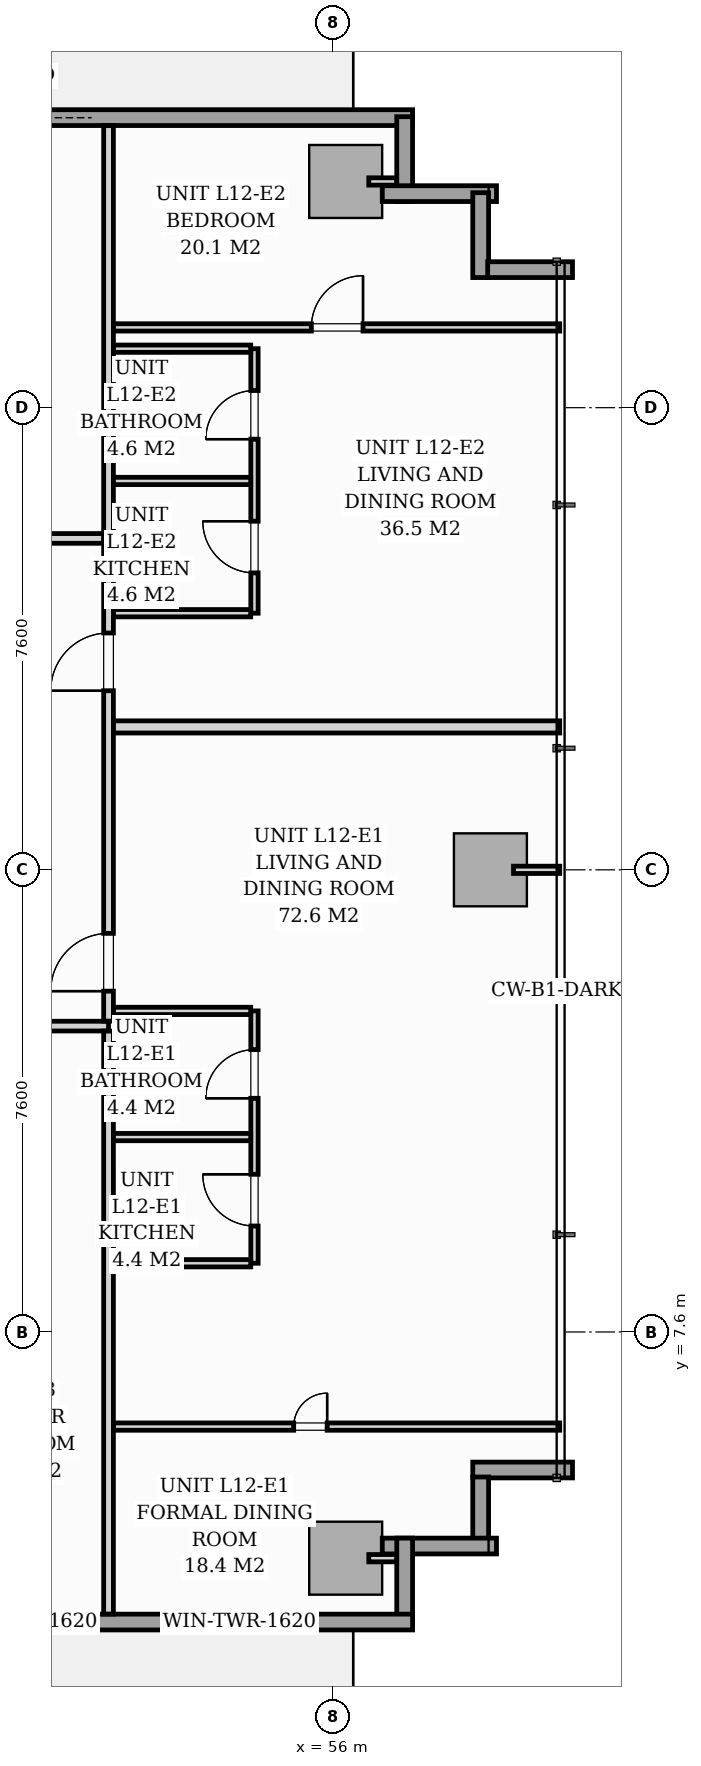
"""IFC4 building model, lengths in metres.
Left out: names, types, materials, properties, quantities, classifications, styles, units other than length and angle.
Written with IfcOpenShell. Run it as: python <this file> out.ifc"""

import sys

from ifc_helpers import new_model, si_unit, direction, frame, frame_2d, origin, origin_2d, place, context, subcontext, project, spatial, rectangle, extrude, source, transform, mapped, element, fill, save


model = new_model("IFC4")
c1 = context("Model", 3, precision=1e-05, world=origin(), true_north=direction((0.0, 1.0)))
c2 = subcontext(c1, "Body", "Model", "MODEL_VIEW")
j1 = project(units=[si_unit("LENGTHUNIT", "METRE"), si_unit("PLANEANGLEUNIT", "RADIAN")], contexts=[c1])
p1 = place(None, origin())
s1 = spatial("IfcSite", under=j1, at=p1, CompositionType="ELEMENT")
p2 = place(p1, origin())
s2 = spatial("IfcBuilding", under=s1, at=p2, CompositionType="ELEMENT")
p3 = place(p2, frame((0.0, 0.0, 45.4)))
s3 = spatial("IfcBuildingStorey", under=s2, at=p3, CompositionType="ELEMENT", Elevation=45.4)
m1 = source(origin(), c2, "Body", "SweptSolid", [
    extrude(rectangle(XDim=1.2, YDim=1.2, at=origin_2d()), origin(), (0.0, 0.0, 1.0), 3.196),
])
for number, where, z_axis, x_axis in (
    (1, (56.2, 3.88, 0.002), (0.0, 0.0, 1.0), (1.0, 0.0, 0.0)),
    (2, (56.2, 26.52, 0.002), (0.0, 0.0, 1.0), (1.0, 0.0, 0.0)),
    (3, (58.58, 15.2, 0.002), (0.0, 0.0, 1.0), (1.0, 0.0, 0.0)),
):
    element("IfcColumn", number, at=place(p3, frame(where, z_axis=z_axis, x_axis=x_axis)), inside=s3, PredefinedType="COLUMN", context=c2, shape_type="MappedRepresentation", body=[
        mapped(m1, transform((0.0, 0.0, 0.0), scale=1.0)),
    ])
p4 = place(p3, frame((40.15, 27.57, 0.0), z_axis=(0.0, 0.0, 1.0), x_axis=(1.0, 0.0, 0.0)))
e4 = element("IfcWall", 4, at=p4, inside=s3, PredefinedType="STANDARD", context=c2, shape_type="SweptSolid", body=[
    extrude(rectangle(XDim=17.15, YDim=0.26, at=frame_2d((8.575, 0.0))), origin(), (0.0, 0.0, 1.0), 2.94),
])
p5 = place(p4, frame((9.26, 0.0, 0.0)))
e5 = element("IfcOpeningElement", 5, at=p5, cuts=e4, PredefinedType="OPENING", context=c2, shape_type="SweptSolid", body=[
    extrude(rectangle(XDim=1.8, YDim=2.06, at=frame_2d((0.9, 1.03))), frame((0.0, 0.14, 0.0), z_axis=(0.0, -1.0, 0.0), x_axis=(1.0, 0.0, 0.0)), (0.0, 0.0, 1.0), 0.28),
])
p6 = place(p4, frame((0.7, 0.0, 0.65)))
e6 = element("IfcOpeningElement", 6, at=p6, cuts=e4, PredefinedType="OPENING", context=c2, shape_type="SweptSolid", body=[
    extrude(rectangle(XDim=1.6, YDim=1.5, at=frame_2d((0.8, 0.75))), frame((0.0, 0.14, 0.0), z_axis=(0.0, -1.0, 0.0), x_axis=(1.0, 0.0, 0.0)), (0.0, 0.0, 1.0), 0.28),
])
p7 = place(p3, frame((57.17, 27.585, 0.0), z_axis=(0.0, 0.0, 1.0), x_axis=(0.0, -1.0, 0.0)))
e7 = element("IfcWall", 7, at=p7, inside=s3, PredefinedType="STANDARD", context=c2, shape_type="SweptSolid", body=[
    extrude(rectangle(XDim=1.395, YDim=0.26, at=frame_2d((0.698, 0.0))), origin(), (0.0, 0.0, 1.0), 2.94),
])
p8 = place(p3, frame((56.802, 26.32, 0.0), z_axis=(0.0, 0.0, 1.0), x_axis=(1.0, 0.0, 0.0)))
e8 = element("IfcWall", 8, at=p8, inside=s3, PredefinedType="STANDARD", context=c2, shape_type="SweptSolid", body=[
    extrude(rectangle(XDim=1.878, YDim=0.26, at=frame_2d((0.939, 0.0))), origin(), (0.0, 0.0, 1.0), 2.94),
])
for number, where, z_axis, x_axis in (
    (9, (58.42, 26.335, 0.0), (0.0, 0.0, 1.0), (0.0, -1.0, 0.0)),
    (10, (58.535, 25.07, 0.0), (0.0, 0.0, 1.0), (1.0, 0.0, 0.0)),
):
    element("IfcWall", number, at=place(p3, frame(where, z_axis=z_axis, x_axis=x_axis)), inside=s3, PredefinedType="STANDARD", context=c2, shape_type="SweptSolid", body=[
        extrude(rectangle(XDim=1.395, YDim=0.26, at=frame_2d((0.698, 0.0))), origin(), (0.0, 0.0, 1.0), 2.94),
    ])
p9 = place(p3, frame((59.93, 5.33, 0.0), z_axis=(0.0, 0.0, 1.0), x_axis=(-1.0, 0.0, 0.0)))
e11 = element("IfcWall", 11, at=p9, inside=s3, PredefinedType="STANDARD", context=c2, shape_type="SweptSolid", body=[
    extrude(rectangle(XDim=1.64, YDim=0.26, at=frame_2d((0.82, 0.0))), origin(), (0.0, 0.0, 1.0), 2.94),
])
p10 = place(p3, frame((58.42, 5.215, 0.0), z_axis=(0.0, 0.0, 1.0), x_axis=(0.0, -1.0, 0.0)))
e12 = element("IfcWall", 12, at=p10, inside=s3, PredefinedType="STANDARD", context=c2, shape_type="SweptSolid", body=[
    extrude(rectangle(XDim=1.15, YDim=0.26, at=frame_2d((0.575, 0.0))), origin(), (0.0, 0.0, 1.0), 2.94),
])
p11 = place(p3, frame((58.68, 4.08, 0.0), z_axis=(0.0, 0.0, 1.0), x_axis=(-1.0, 0.0, 0.0)))
e13 = element("IfcWall", 13, at=p11, inside=s3, PredefinedType="STANDARD", context=c2, shape_type="SweptSolid", body=[
    extrude(rectangle(XDim=1.878, YDim=0.26, at=frame_2d((0.939, 0.0))), origin(), (0.0, 0.0, 1.0), 2.94),
])
p12 = place(p3, frame((57.17, 4.21, 0.0), z_axis=(0.0, 0.0, 1.0), x_axis=(0.0, -1.0, 0.0)))
e14 = element("IfcWall", 14, at=p12, inside=s3, PredefinedType="STANDARD", context=c2, shape_type="SweptSolid", body=[
    extrude(rectangle(XDim=1.395, YDim=0.26, at=frame_2d((0.698, 0.0))), origin(), (0.0, 0.0, 1.0), 2.94),
])
p13 = place(p3, frame((57.3, 2.83, 0.0), z_axis=(0.0, 0.0, 1.0), x_axis=(-1.0, 0.0, 0.0)))
e15 = element("IfcWall", 15, at=p13, inside=s3, PredefinedType="STANDARD", context=c2, shape_type="SweptSolid", body=[
    extrude(rectangle(XDim=17.15, YDim=0.26, at=frame_2d((8.575, 0.0))), origin(), (0.0, 0.0, 1.0), 2.94),
])
p14 = place(p13, frame((8.177, 0.0, 0.0)))
e16 = element("IfcOpeningElement", 16, at=p14, cuts=e15, PredefinedType="OPENING", context=c2, shape_type="SweptSolid", body=[
    extrude(rectangle(XDim=1.8, YDim=2.06, at=frame_2d((0.9, 1.03))), frame((0.0, 0.14, 0.0), z_axis=(0.0, -1.0, 0.0), x_axis=(1.0, 0.0, 0.0)), (0.0, 0.0, 1.0), 0.28),
])
p15 = place(p13, frame((2.05, 0.0, 0.65)))
e17 = element("IfcOpeningElement", 17, at=p15, cuts=e15, PredefinedType="OPENING", context=c2, shape_type="SweptSolid", body=[
    extrude(rectangle(XDim=1.6, YDim=1.5, at=frame_2d((0.8, 0.75))), frame((0.0, 0.14, 0.0), z_axis=(0.0, -1.0, 0.0), x_axis=(1.0, 0.0, 0.0)), (0.0, 0.0, 1.0), 0.28),
])
p16 = place(p13, frame((5.644, 0.0, 0.75)))
e18 = element("IfcOpeningElement", 18, at=p16, cuts=e15, PredefinedType="OPENING", context=c2, shape_type="SweptSolid", body=[
    extrude(rectangle(XDim=1.6, YDim=1.5, at=frame_2d((0.8, 0.75))), frame((0.0, 0.14, 0.0), z_axis=(0.0, -1.0, 0.0), x_axis=(1.0, 0.0, 0.0)), (0.0, 0.0, 1.0), 0.28),
])
p17 = place(p3, frame((15.2, 12.63, 0.0), z_axis=(0.0, 0.0, 1.0), x_axis=(1.0, 0.0, 0.0)))
e19 = element("IfcWall", 19, at=p17, inside=s3, PredefinedType="PARTITIONING", context=c2, shape_type="SweptSolid", body=[
    extrude(rectangle(XDim=37.1, YDim=0.16, at=frame_2d((18.55, 0.0))), origin(), (0.0, 0.0, 1.0), 2.94),
])
p18 = place(p17, frame((1.572, 0.0, 0.0)))
e20 = element("IfcOpeningElement", 20, at=p18, cuts=e19, PredefinedType="OPENING", context=c2, shape_type="SweptSolid", body=[
    extrude(rectangle(XDim=0.95, YDim=2.06, at=frame_2d((0.475, 1.03))), frame((0.0, 0.09, 0.0), z_axis=(0.0, -1.0, 0.0), x_axis=(1.0, 0.0, 0.0)), (0.0, 0.0, 1.0), 0.18),
])
p19 = place(p17, frame((14.877, 0.0, 0.0)))
e21 = element("IfcOpeningElement", 21, at=p19, cuts=e19, PredefinedType="OPENING", context=c2, shape_type="SweptSolid", body=[
    extrude(rectangle(XDim=0.95, YDim=2.06, at=frame_2d((0.475, 1.03))), frame((0.0, 0.09, 0.0), z_axis=(0.0, -1.0, 0.0), x_axis=(1.0, 0.0, 0.0)), (0.0, 0.0, 1.0), 0.18),
])
p20 = place(p17, frame((28.476, 0.0, 0.0)))
e22 = element("IfcOpeningElement", 22, at=p20, cuts=e19, PredefinedType="OPENING", context=c2, shape_type="SweptSolid", body=[
    extrude(rectangle(XDim=0.95, YDim=2.06, at=frame_2d((0.475, 1.03))), frame((0.0, 0.09, 0.0), z_axis=(0.0, -1.0, 0.0), x_axis=(1.0, 0.0, 0.0)), (0.0, 0.0, 1.0), 0.18),
])
p21 = place(p3, frame((52.3, 2.962, 0.0), z_axis=(0.0, 0.0, 1.0), x_axis=(0.0, 1.0, 0.0)))
e23 = element("IfcWall", 23, at=p21, inside=s3, PredefinedType="PARTITIONING", context=c2, shape_type="SweptSolid", body=[
    extrude(rectangle(XDim=9.586, YDim=0.16, at=frame_2d((4.793, 0.0))), origin(), (0.0, 0.0, 1.0), 2.94),
])
p22 = place(p3, frame((52.3, 12.712, 0.0), z_axis=(0.0, 0.0, 1.0), x_axis=(0.0, 1.0, 0.0)))
e24 = element("IfcWall", 24, at=p22, inside=s3, PredefinedType="PARTITIONING", context=c2, shape_type="SweptSolid", body=[
    extrude(rectangle(XDim=14.726, YDim=0.16, at=frame_2d((7.363, 0.0))), origin(), (0.0, 0.0, 1.0), 2.94),
])
p23 = place(p22, frame((0.493, 0.0, 0.0)))
e25 = element("IfcOpeningElement", 25, at=p23, cuts=e24, PredefinedType="OPENING", context=c2, shape_type="SweptSolid", body=[
    extrude(rectangle(XDim=0.95, YDim=2.06, at=frame_2d((0.475, 1.03))), frame((0.0, 0.09, 0.0), z_axis=(0.0, -1.0, 0.0), x_axis=(1.0, 0.0, 0.0)), (0.0, 0.0, 1.0), 0.18),
])
p24 = place(p22, frame((5.433, 0.0, 0.0)))
e26 = element("IfcOpeningElement", 26, at=p24, cuts=e24, PredefinedType="OPENING", context=c2, shape_type="SweptSolid", body=[
    extrude(rectangle(XDim=0.95, YDim=2.06, at=frame_2d((0.475, 1.03))), frame((0.0, 0.09, 0.0), z_axis=(0.0, -1.0, 0.0), x_axis=(1.0, 0.0, 0.0)), (0.0, 0.0, 1.0), 0.18),
])
p25 = place(p3, frame((52.382, 17.55, 0.0), z_axis=(0.0, 0.0, 1.0), x_axis=(1.0, 0.0, 0.0)))
e27 = element("IfcWall", 27, at=p25, inside=s3, PredefinedType="PARTITIONING", context=c2, shape_type="SweptSolid", body=[
    extrude(rectangle(XDim=7.338, YDim=0.2, at=frame_2d((3.669, 0.0))), origin(), (0.0, 0.0, 1.0), 2.94),
])
p26 = place(p3, frame((54.7, 8.73, 0.0), z_axis=(0.0, 0.0, 1.0), x_axis=(0.0, 1.0, 0.0)))
e28 = element("IfcWall", 28, at=p26, inside=s3, PredefinedType="PARTITIONING", context=c2, shape_type="SweptSolid", body=[
    extrude(rectangle(XDim=4.15, YDim=0.12, at=frame_2d((2.075, 0.0))), origin(), (0.0, 0.0, 1.0), 2.94),
])
p27 = place(p26, frame((0.613, 0.0, 0.0)))
e29 = element("IfcOpeningElement", 29, at=p27, cuts=e28, PredefinedType="OPENING", context=c2, shape_type="SweptSolid", body=[
    extrude(rectangle(XDim=0.85, YDim=2.05, at=frame_2d((0.425, 1.025))), frame((0.0, 0.07, 0.0), z_axis=(0.0, -1.0, 0.0), x_axis=(1.0, 0.0, 0.0)), (0.0, 0.0, 1.0), 0.14),
])
p28 = place(p26, frame((2.713, 0.0, 0.0)))
e30 = element("IfcOpeningElement", 30, at=p28, cuts=e28, PredefinedType="OPENING", context=c2, shape_type="SweptSolid", body=[
    extrude(rectangle(XDim=0.8, YDim=2.02, at=frame_2d((0.4, 1.01))), frame((0.0, 0.07, 0.0), z_axis=(0.0, -1.0, 0.0), x_axis=(1.0, 0.0, 0.0)), (0.0, 0.0, 1.0), 0.14),
])
for number, where, z_axis, x_axis in (
    (31, (52.382, 10.805, 0.0), (0.0, 0.0, 1.0), (1.0, 0.0, 0.0)),
    (32, (52.382, 8.73, 0.0), (0.0, 0.0, 1.0), (1.0, 0.0, 0.0)),
    (33, (52.382, 12.88, 0.0), (0.0, 0.0, 1.0), (1.0, 0.0, 0.0)),
):
    element("IfcWall", number, at=place(p3, frame(where, z_axis=z_axis, x_axis=x_axis)), inside=s3, PredefinedType="PARTITIONING", context=c2, shape_type="SweptSolid", body=[
        extrude(rectangle(XDim=2.256, YDim=0.12, at=frame_2d((1.128, 0.0))), origin(), (0.0, 0.0, 1.0), 2.94),
    ])
p29 = place(p3, frame((52.382, 6.044, 0.0), z_axis=(0.0, 0.0, 1.0), x_axis=(1.0, 0.0, 0.0)))
e34 = element("IfcWall", 34, at=p29, inside=s3, PredefinedType="PARTITIONING", context=c2, shape_type="SweptSolid", body=[
    extrude(rectangle(XDim=7.338, YDim=0.12, at=frame_2d((3.669, 0.0))), origin(), (0.0, 0.0, 1.0), 2.94),
])
p30 = place(p29, frame((2.963, 0.0, 0.0)))
e35 = element("IfcOpeningElement", 35, at=p30, cuts=e34, PredefinedType="OPENING", context=c2, shape_type="SweptSolid", body=[
    extrude(rectangle(XDim=0.55, YDim=2.0, at=frame_2d((0.275, 1.0))), frame((0.0, 0.07, 0.0), z_axis=(0.0, -1.0, 0.0), x_axis=(1.0, 0.0, 0.0)), (0.0, 0.0, 1.0), 0.14),
])
p31 = place(p3, frame((54.7, 19.42, 0.0), z_axis=(0.0, 0.0, 1.0), x_axis=(0.0, 1.0, 0.0)))
e36 = element("IfcWall", 36, at=p31, inside=s3, PredefinedType="PARTITIONING", context=c2, shape_type="SweptSolid", body=[
    extrude(rectangle(XDim=4.35, YDim=0.12, at=frame_2d((2.175, 0.0))), origin(), (0.0, 0.0, 1.0), 2.94),
])
p32 = place(p31, frame((0.663, 0.0, 0.0)))
e37 = element("IfcOpeningElement", 37, at=p32, cuts=e36, PredefinedType="OPENING", context=c2, shape_type="SweptSolid", body=[
    extrude(rectangle(XDim=0.85, YDim=2.05, at=frame_2d((0.425, 1.025))), frame((0.0, 0.07, 0.0), z_axis=(0.0, -1.0, 0.0), x_axis=(1.0, 0.0, 0.0)), (0.0, 0.0, 1.0), 0.14),
])
p33 = place(p31, frame((2.862, 0.0, 0.0)))
e38 = element("IfcOpeningElement", 38, at=p33, cuts=e36, PredefinedType="OPENING", context=c2, shape_type="SweptSolid", body=[
    extrude(rectangle(XDim=0.8, YDim=2.02, at=frame_2d((0.4, 1.01))), frame((0.0, 0.07, 0.0), z_axis=(0.0, -1.0, 0.0), x_axis=(1.0, 0.0, 0.0)), (0.0, 0.0, 1.0), 0.14),
])
for number, where, z_axis, x_axis in (
    (39, (52.382, 21.595, 0.0), (0.0, 0.0, 1.0), (1.0, 0.0, 0.0)),
    (40, (52.382, 19.42, 0.0), (0.0, 0.0, 1.0), (1.0, 0.0, 0.0)),
    (41, (52.382, 23.77, 0.0), (0.0, 0.0, 1.0), (1.0, 0.0, 0.0)),
):
    element("IfcWall", number, at=place(p3, frame(where, z_axis=z_axis, x_axis=x_axis)), inside=s3, PredefinedType="PARTITIONING", context=c2, shape_type="SweptSolid", body=[
        extrude(rectangle(XDim=2.256, YDim=0.12, at=frame_2d((1.128, 0.0))), origin(), (0.0, 0.0, 1.0), 2.94),
    ])
p34 = place(p3, frame((52.382, 24.12, 0.0), z_axis=(0.0, 0.0, 1.0), x_axis=(1.0, 0.0, 0.0)))
e42 = element("IfcWall", 42, at=p34, inside=s3, PredefinedType="PARTITIONING", context=c2, shape_type="SweptSolid", body=[
    extrude(rectangle(XDim=7.338, YDim=0.12, at=frame_2d((3.669, 0.0))), origin(), (0.0, 0.0, 1.0), 2.94),
])
p35 = place(p34, frame((3.253, 0.0, 0.0)))
e43 = element("IfcOpeningElement", 43, at=p35, cuts=e42, PredefinedType="OPENING", context=c2, shape_type="SweptSolid", body=[
    extrude(rectangle(XDim=0.85, YDim=2.05, at=frame_2d((0.425, 1.025))), frame((0.0, 0.07, 0.0), z_axis=(0.0, -1.0, 0.0), x_axis=(1.0, 0.0, 0.0)), (0.0, 0.0, 1.0), 0.14),
])
p36 = place(p3, frame((50.432, 20.65, 0.0), z_axis=(0.0, 0.0, 1.0), x_axis=(1.0, 0.0, 0.0)))
e44 = element("IfcWall", 44, at=p36, inside=s3, PredefinedType="PARTITIONING", context=c2, shape_type="SweptSolid", body=[
    extrude(rectangle(XDim=1.786, YDim=0.16, at=frame_2d((0.893, 0.0))), origin(), (0.0, 0.0, 1.0), 2.94),
])
for number, where, z_axis, x_axis in (
    (45, (56.58, 3.88, 0.0), (0.0, 0.0, 1.0), (1.0, 0.0, 0.0)),
    (46, (56.58, 26.52, 0.0), (0.0, 0.0, 1.0), (1.0, 0.0, 0.0)),
):
    element("IfcWall", number, at=place(p3, frame(where, z_axis=z_axis, x_axis=x_axis)), inside=s3, PredefinedType="PARTITIONING", context=c2, shape_type="SweptSolid", body=[
        extrude(rectangle(XDim=0.458, YDim=0.12, at=frame_2d((0.229, 0.0))), origin(), (0.0, 0.0, 1.0), 2.94),
    ])
p37 = place(p3, frame((58.96, 15.2, 0.0), z_axis=(0.0, 0.0, 1.0), x_axis=(1.0, 0.0, 0.0)))
e47 = element("IfcWall", 47, at=p37, inside=s3, PredefinedType="PARTITIONING", context=c2, shape_type="SweptSolid", body=[
    extrude(rectangle(XDim=0.76, YDim=0.12, at=frame_2d((0.38, 0.0))), origin(), (0.0, 0.0, 1.0), 2.94),
])
m2 = source(origin(), c2, "Body", "SweptSolid", [
    extrude(rectangle(XDim=1.6, YDim=1.5, at=frame_2d((0.8, 0.75))), frame((0.0, 0.03, 0.0), z_axis=(0.0, -1.0, 0.0), x_axis=(1.0, 0.0, 0.0)), (0.0, 0.0, 1.0), 0.06),
])
p38 = place(p15, origin())
e48 = element("IfcWindow", 48, at=p38, inside=s3, PartitioningType="SINGLE_PANEL", PredefinedType="WINDOW", context=c2, shape_type="MappedRepresentation", body=[
    mapped(m2, transform((0.0, 0.0, 0.0), scale=1.0)),
])
fill(e17, e48)
p39 = place(p16, origin())
e49 = element("IfcWindow", 49, at=p39, inside=s3, PartitioningType="SINGLE_PANEL", PredefinedType="WINDOW", context=c2, shape_type="MappedRepresentation", body=[
    mapped(m2, transform((0.0, 0.0, 0.0), scale=1.0)),
])
fill(e18, e49)
m3 = source(origin(), c2, "Body", "SweptSolid", [
    extrude(rectangle(XDim=0.95, YDim=2.06, at=frame_2d((0.475, 1.03))), frame((0.0, 0.025, 0.0), z_axis=(0.0, -1.0, 0.0), x_axis=(1.0, 0.0, 0.0)), (0.0, 0.0, 1.0), 0.05),
])
p40 = place(p23, origin())
e50 = element("IfcDoor", 50, at=p40, inside=s3, OperationType="SINGLE_SWING_LEFT", PredefinedType="DOOR", context=c2, shape_type="MappedRepresentation", body=[
    mapped(m3, transform((0.0, 0.0, 0.0), scale=1.0)),
])
fill(e25, e50)
m4 = source(origin(), c2, "Body", "SweptSolid", [
    extrude(rectangle(XDim=0.85, YDim=2.05, at=frame_2d((0.425, 1.025))), frame((0.0, 0.025, 0.0), z_axis=(0.0, -1.0, 0.0), x_axis=(1.0, 0.0, 0.0)), (0.0, 0.0, 1.0), 0.05),
])
p41 = place(p27, origin())
e51 = element("IfcDoor", 51, at=p41, inside=s3, OperationType="SINGLE_SWING_RIGHT", PredefinedType="DOOR", context=c2, shape_type="MappedRepresentation", body=[
    mapped(m4, transform((0.0, 0.0, 0.0), scale=1.0)),
])
fill(e29, e51)
m5 = source(origin(), c2, "Body", "SweptSolid", [
    extrude(rectangle(XDim=0.8, YDim=2.02, at=frame_2d((0.4, 1.01))), frame((0.0, 0.025, 0.0), z_axis=(0.0, -1.0, 0.0), x_axis=(1.0, 0.0, 0.0)), (0.0, 0.0, 1.0), 0.05),
])
p42 = place(p28, origin())
e52 = element("IfcDoor", 52, at=p42, inside=s3, OperationType="SINGLE_SWING_LEFT", PredefinedType="DOOR", context=c2, shape_type="MappedRepresentation", body=[
    mapped(m5, transform((0.0, 0.0, 0.0), scale=1.0)),
])
fill(e30, e52)
m6 = source(origin(), c2, "Body", "SweptSolid", [
    extrude(rectangle(XDim=0.55, YDim=2.0, at=frame_2d((0.275, 1.0))), frame((0.0, 0.025, 0.0), z_axis=(0.0, -1.0, 0.0), x_axis=(1.0, 0.0, 0.0)), (0.0, 0.0, 1.0), 0.05),
])
p43 = place(p30, origin())
e53 = element("IfcDoor", 53, at=p43, inside=s3, OperationType="SINGLE_SWING_RIGHT", PredefinedType="DOOR", context=c2, shape_type="MappedRepresentation", body=[
    mapped(m6, transform((0.0, 0.0, 0.0), scale=1.0)),
])
fill(e35, e53)
p44 = place(p24, origin())
e54 = element("IfcDoor", 54, at=p44, inside=s3, OperationType="SINGLE_SWING_LEFT", PredefinedType="DOOR", context=c2, shape_type="MappedRepresentation", body=[
    mapped(m3, transform((0.0, 0.0, 0.0), scale=1.0)),
])
fill(e26, e54)
p45 = place(p32, origin())
e55 = element("IfcDoor", 55, at=p45, inside=s3, OperationType="SINGLE_SWING_RIGHT", PredefinedType="DOOR", context=c2, shape_type="MappedRepresentation", body=[
    mapped(m4, transform((0.0, 0.0, 0.0), scale=1.0)),
])
fill(e37, e55)
p46 = place(p33, origin())
e56 = element("IfcDoor", 56, at=p46, inside=s3, OperationType="SINGLE_SWING_LEFT", PredefinedType="DOOR", context=c2, shape_type="MappedRepresentation", body=[
    mapped(m5, transform((0.0, 0.0, 0.0), scale=1.0)),
])
fill(e38, e56)
p47 = place(p35, origin())
e57 = element("IfcDoor", 57, at=p47, inside=s3, OperationType="SINGLE_SWING_RIGHT", PredefinedType="DOOR", context=c2, shape_type="MappedRepresentation", body=[
    mapped(m4, transform((0.0, 0.0, 0.0), scale=1.0)),
])
fill(e43, e57)
save(model, sys.argv[1])
